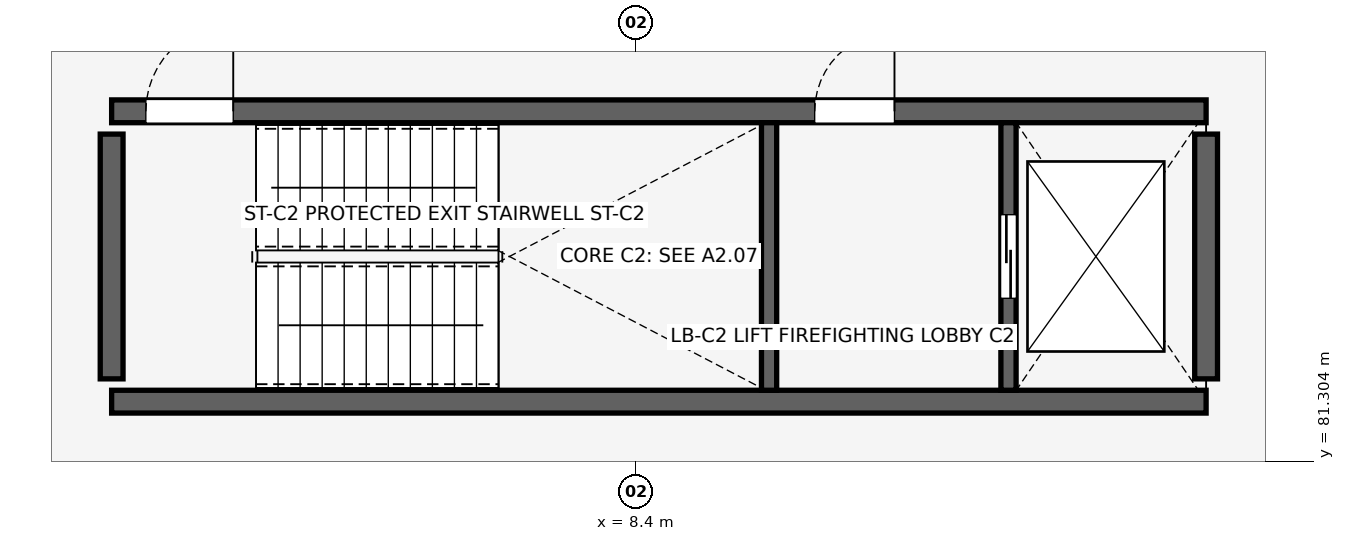
"""IFC4 building model, lengths in metres.
Left out: names, types, materials, properties, quantities, classifications, styles, units other than length and angle.
Written with IfcOpenShell. Run it as: python <this file> out.ifc"""

import sys

from ifc_helpers import new_model, si_unit, direction, frame, frame_2d, origin, place, context, subcontext, project, spatial, rectangle, extrude, element, fill, save


model = new_model("IFC4")
c1 = context("Model", 3, precision=1e-05, world=origin(), true_north=direction((0.0, 1.0)))
c2 = subcontext(c1, "Body", "Model", "MODEL_VIEW")
j1 = project(units=[si_unit("LENGTHUNIT", "METRE"), si_unit("PLANEANGLEUNIT", "RADIAN")], contexts=[c1])
p1 = place(None, origin())
s1 = spatial("IfcSite", under=j1, at=p1, CompositionType="ELEMENT")
p2 = place(p1, origin())
s2 = spatial("IfcBuilding", under=s1, at=p2, CompositionType="ELEMENT")
p3 = place(p2, frame((0.0, 0.0, 13.36)))
s3 = spatial("IfcBuildingStorey", under=s2, at=p3, CompositionType="ELEMENT", Elevation=13.36)
p4 = place(p3, frame((1.5, 82.09, 0.0), z_axis=(0.0, 0.0, 1.0), x_axis=(1.0, 0.0, 0.0)))
e1 = element("IfcWall", 1, at=p4, inside=s3, PredefinedType="SHEAR", context=c2, shape_type="SweptSolid", body=[
    extrude(rectangle(XDim=14.4, YDim=0.3, at=frame_2d((7.2, 0.0))), origin(), (0.0, 0.0, 1.0), 3.58),
])
p5 = place(p3, frame((1.5, 85.91, 0.0), z_axis=(0.0, 0.0, 1.0), x_axis=(1.0, 0.0, 0.0)))
e2 = element("IfcWall", 2, at=p5, inside=s3, PredefinedType="SHEAR", context=c2, shape_type="SweptSolid", body=[
    extrude(rectangle(XDim=14.4, YDim=0.3, at=frame_2d((7.2, 0.0))), origin(), (0.0, 0.0, 1.0), 3.58),
])
p6 = place(p5, frame((0.45, 0.0, 0.0), z_axis=(0.0, 0.0, 1.0), x_axis=(1.0, 0.0, 0.0)))
e3 = element("IfcOpeningElement", 3, at=p6, cuts=e2, PredefinedType="OPENING", context=c2, shape_type="SweptSolid", body=[
    extrude(rectangle(XDim=1.15, YDim=2.15, at=frame_2d((0.575, 1.075))), frame((0.0, 0.16, 0.0), z_axis=(0.0, -1.0, 0.0), x_axis=(1.0, 0.0, 0.0)), (0.0, 0.0, 1.0), 0.32),
])
p7 = place(p5, frame((9.25, 0.0, 0.0), z_axis=(0.0, 0.0, 1.0), x_axis=(1.0, 0.0, 0.0)))
e4 = element("IfcOpeningElement", 4, at=p7, cuts=e2, PredefinedType="OPENING", context=c2, shape_type="SweptSolid", body=[
    extrude(rectangle(XDim=1.05, YDim=2.15, at=frame_2d((0.525, 1.075))), frame((0.0, 0.16, 0.0), z_axis=(0.0, -1.0, 0.0), x_axis=(1.0, 0.0, 0.0)), (0.0, 0.0, 1.0), 0.32),
])
for number, where, z_axis, x_axis in (
    (5, (1.5, 82.39, 0.0), (0.0, 0.0, 1.0), (0.0, 1.0, 0.0)),
    (6, (15.9, 82.39, 0.0), (0.0, 0.0, 1.0), (0.0, 1.0, 0.0)),
):
    element("IfcWall", number, at=place(p3, frame(where, z_axis=z_axis, x_axis=x_axis)), inside=s3, PredefinedType="SHEAR", context=c2, shape_type="SweptSolid", body=[
        extrude(rectangle(XDim=3.22, YDim=0.3, at=frame_2d((1.61, 0.0))), origin(), (0.0, 0.0, 1.0), 3.58),
    ])
p8 = place(p3, frame((10.15, 82.24, 0.0), z_axis=(0.0, 0.0, 1.0), x_axis=(0.0, 1.0, 0.0)))
e7 = element("IfcWall", 7, at=p8, inside=s3, PredefinedType="SHEAR", context=c2, shape_type="SweptSolid", body=[
    extrude(rectangle(XDim=3.52, YDim=0.2, at=frame_2d((1.76, 0.0))), origin(), (0.0, 0.0, 1.0), 3.58),
])
p9 = place(p3, frame((13.3, 82.24, 0.0), z_axis=(0.0, 0.0, 1.0), x_axis=(0.0, 1.0, 0.0)))
e8 = element("IfcWall", 8, at=p9, inside=s3, PredefinedType="SHEAR", context=c2, shape_type="SweptSolid", body=[
    extrude(rectangle(XDim=3.52, YDim=0.2, at=frame_2d((1.76, 0.0))), origin(), (0.0, 0.0, 1.0), 3.58),
])
p10 = place(p9, frame((1.21, 0.0, 0.0), z_axis=(0.0, 0.0, 1.0), x_axis=(1.0, 0.0, 0.0)))
e9 = element("IfcOpeningElement", 9, at=p10, cuts=e8, PredefinedType="OPENING", context=c2, shape_type="SweptSolid", body=[
    extrude(rectangle(XDim=1.1, YDim=2.15, at=frame_2d((0.55, 1.075))), frame((0.0, 0.11, 0.0), z_axis=(0.0, -1.0, 0.0), x_axis=(1.0, 0.0, 0.0)), (0.0, 0.0, 1.0), 0.22),
])
p11 = place(p6, origin())
e10 = element("IfcDoor", 10, at=p11, inside=s3, OperationType="SINGLE_SWING_RIGHT", PredefinedType="DOOR", context=c2, shape_type="SweptSolid", body=[
    extrude(rectangle(XDim=1.15, YDim=2.15, at=frame_2d((0.575, 1.075))), frame((0.0, 0.025, 0.0), z_axis=(0.0, -1.0, 0.0), x_axis=(1.0, 0.0, 0.0)), (0.0, 0.0, 1.0), 0.05),
])
fill(e3, e10)
p12 = place(p7, origin())
e11 = element("IfcDoor", 11, at=p12, inside=s3, OperationType="SINGLE_SWING_RIGHT", PredefinedType="DOOR", context=c2, shape_type="SweptSolid", body=[
    extrude(rectangle(XDim=1.05, YDim=2.15, at=frame_2d((0.525, 1.075))), frame((0.0, 0.025, 0.0), z_axis=(0.0, -1.0, 0.0), x_axis=(1.0, 0.0, 0.0)), (0.0, 0.0, 1.0), 0.05),
])
fill(e4, e11)
p13 = place(p10, origin())
e12 = element("IfcDoor", 12, at=p13, inside=s3, OperationType="DOUBLE_DOOR_SLIDING", PredefinedType="DOOR", context=c2, shape_type="SweptSolid", body=[
    extrude(rectangle(XDim=1.1, YDim=2.15, at=frame_2d((0.55, 1.075))), frame((0.0, 0.025, 0.0), z_axis=(0.0, -1.0, 0.0), x_axis=(1.0, 0.0, 0.0)), (0.0, 0.0, 1.0), 0.05),
])
fill(e9, e12)
save(model, sys.argv[1])
